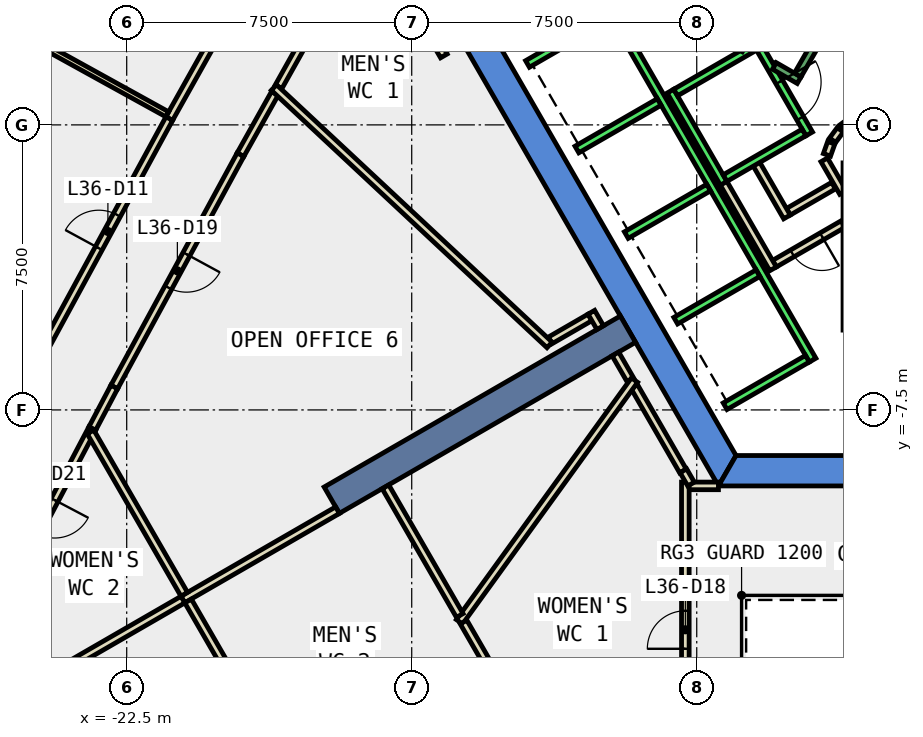
"""IFC4 building model, lengths in metres.
Left out: names, types, materials, properties, quantities, classifications, styles, units other than length and angle.
Written with IfcOpenShell. Run it as: python <this file> out.ifc"""

import sys

from ifc_helpers import new_model, si_unit, direction, frame, frame_2d, origin, place, context, subcontext, project, spatial, polyline, rectangle, outline, extrude, element, fill, save


model = new_model("IFC4")
c1 = context("Model", 3, precision=1e-05, world=origin(), true_north=direction((0.0, 1.0)))
c2 = subcontext(c1, "Body", "Model", "MODEL_VIEW")
j1 = project(units=[si_unit("LENGTHUNIT", "METRE"), si_unit("PLANEANGLEUNIT", "RADIAN")], contexts=[c1])
p1 = place(None, origin())
s1 = spatial("IfcSite", under=j1, at=p1, CompositionType="ELEMENT")
p2 = place(p1, origin())
s2 = spatial("IfcBuilding", under=s1, at=p2, CompositionType="ELEMENT")
p3 = place(p2, frame((0.0, 0.0, 163.4)))
s3 = spatial("IfcBuildingStorey", under=s2, at=p3, CompositionType="ELEMENT", Elevation=163.4)
p4 = place(p3, frame((0.0, 0.0, -0.4)))
e1 = element("IfcWall", 1, at=p4, inside=s3, PredefinedType="SHEAR", context=c2, shape_type="SweptSolid", body=[
    extrude(outline(polyline([(-13.856, 2.5), (-6.928, -9.5), (-6.466, -8.7), (-12.933, 2.5), (-13.856, 2.5)])), origin(), (0.0, 0.0, 1.0), 4.2),
])
p5 = place(p3, frame((0.0, 0.0, -0.4)))
e2 = element("IfcWall", 2, at=p5, inside=s3, PredefinedType="SHEAR", context=c2, shape_type="SweptSolid", body=[
    extrude(outline(polyline([(3.75, -9.5), (3.75, -8.7), (-6.466, -8.7), (-6.928, -9.5), (3.75, -9.5)])), origin(), (0.0, 0.0, 1.0), 4.2),
])
p6 = place(p3, frame((-9.31, -5.375, -0.4), z_axis=(0.0, 0.0, 1.0), x_axis=(-0.866017533419, -0.500013631625, 0.0)))
e3 = element("IfcWall", 3, at=p6, inside=s3, PredefinedType="SHEAR", context=c2, shape_type="SweptSolid", body=[
    extrude(rectangle(XDim=9.0, YDim=0.8, at=frame_2d((4.5, 0.0))), origin(), (0.0, 0.0, 1.0), 4.2),
])
p7 = place(p3, frame((-14.154, 1.815, 0.0), z_axis=(0.0, 0.0, 1.0), x_axis=(-0.500038857296, 0.866002968352, 0.0)))
e4 = element("IfcWall", 4, at=p7, inside=s3, PredefinedType="PARTITIONING", context=c2, shape_type="SweptSolid", body=[
    extrude(rectangle(XDim=3.34, YDim=0.2, at=frame_2d((1.67, 0.0))), origin(), (0.0, 0.0, 1.0), 3.8),
])
p8 = place(p3, frame((-16.255, 5.014, 0.0), z_axis=(0.0, 0.0, 1.0), x_axis=(-0.488988017817, -0.87229050117, 0.0)))
e5 = element("IfcWall", 5, at=p8, inside=s3, PredefinedType="PARTITIONING", context=c2, shape_type="SweptSolid", body=[
    extrude(rectangle(XDim=4.599, YDim=0.2, at=frame_2d((2.3, 0.0))), origin(), (0.0, 0.0, 1.0), 3.8),
])
p9 = place(p8, frame((1.8, 0.0, 0.0)))
e6 = element("IfcOpeningElement", 6, at=p9, cuts=e5, PredefinedType="OPENING", context=c2, shape_type="SweptSolid", body=[
    extrude(rectangle(XDim=1.0, YDim=2.1, at=frame_2d((0.5, 1.05))), frame((0.0, 0.11, 0.0), z_axis=(0.0, -1.0, 0.0), x_axis=(1.0, 0.0, 0.0)), (0.0, 0.0, 1.0), 0.22),
])
p10 = place(p3, frame((-18.602, 0.828, 0.0), z_axis=(0.0, 0.0, 1.0), x_axis=(-0.488969229043, -0.872301033502, 0.0)))
e7 = element("IfcWall", 7, at=p10, inside=s3, PredefinedType="PARTITIONING", context=c2, shape_type="SweptSolid", body=[
    extrude(rectangle(XDim=1.849, YDim=0.2, at=frame_2d((0.924, 0.0))), origin(), (0.0, 0.0, 1.0), 3.8),
])
p11 = place(p3, frame((-19.506, -0.785, 0.0), z_axis=(0.0, 0.0, 1.0), x_axis=(-0.477513909405, -0.878624189472, 0.0)))
e8 = element("IfcWall", 8, at=p11, inside=s3, PredefinedType="PARTITIONING", context=c2, shape_type="SweptSolid", body=[
    extrude(rectangle(XDim=6.956, YDim=0.2, at=frame_2d((3.478, 0.0))), origin(), (0.0, 0.0, 1.0), 3.8),
])
p12 = place(p11, frame((2.978, 0.0, 0.0)))
e9 = element("IfcOpeningElement", 9, at=p12, cuts=e8, PredefinedType="OPENING", context=c2, shape_type="SweptSolid", body=[
    extrude(rectangle(XDim=1.0, YDim=2.1, at=frame_2d((0.5, 1.05))), frame((0.0, 0.11, 0.0), z_axis=(0.0, -1.0, 0.0), x_axis=(1.0, 0.0, 0.0)), (0.0, 0.0, 1.0), 0.22),
])
p13 = place(p3, frame((-22.828, -6.897, 0.0), z_axis=(0.0, 0.0, 1.0), x_axis=(-0.467225806893, -0.884138023938, 0.0)))
e10 = element("IfcWall", 10, at=p13, inside=s3, PredefinedType="PARTITIONING", context=c2, shape_type="SweptSolid", body=[
    extrude(rectangle(XDim=1.237, YDim=0.2, at=frame_2d((0.619, 0.0))), origin(), (0.0, 0.0, 1.0), 3.8),
])
p14 = place(p3, frame((-23.406, -7.991, 0.0), z_axis=(0.0, 0.0, 1.0), x_axis=(-0.466307932558, -0.884622468646, 0.0)))
e11 = element("IfcWall", 11, at=p14, inside=s3, PredefinedType="PARTITIONING", context=c2, shape_type="SweptSolid", body=[
    extrude(rectangle(XDim=5.25, YDim=0.2, at=frame_2d((2.625, 0.0))), origin(), (0.0, 0.0, 1.0), 3.8),
])
p15 = place(p14, frame((2.125, 0.0, 0.0)))
e12 = element("IfcOpeningElement", 12, at=p15, cuts=e11, PredefinedType="OPENING", context=c2, shape_type="SweptSolid", body=[
    extrude(rectangle(XDim=1.0, YDim=2.1, at=frame_2d((0.5, 1.05))), frame((0.0, 0.11, 0.0), z_axis=(0.0, -1.0, 0.0), x_axis=(1.0, 0.0, 0.0)), (0.0, 0.0, 1.0), 0.22),
])
p16 = place(p3, frame((-21.381, 0.165, 0.0), z_axis=(0.0, 0.0, 1.0), x_axis=(0.489014139272, 0.872275857509, 0.0)))
e13 = element("IfcWall", 13, at=p16, inside=s3, PredefinedType="PARTITIONING", context=c2, shape_type="SweptSolid", body=[
    extrude(rectangle(XDim=7.057, YDim=0.2, at=frame_2d((3.529, 0.0))), origin(), (0.0, 0.0, 1.0), 3.8),
])
p17 = place(p16, frame((3.029, 0.0, 0.0)))
e14 = element("IfcOpeningElement", 14, at=p17, cuts=e13, PredefinedType="OPENING", context=c2, shape_type="SweptSolid", body=[
    extrude(rectangle(XDim=1.0, YDim=2.1, at=frame_2d((0.5, 1.05))), frame((0.0, 0.11, 0.0), z_axis=(0.0, -1.0, 0.0), x_axis=(1.0, 0.0, 0.0)), (0.0, 0.0, 1.0), 0.22),
])
p18 = place(p3, frame((-24.68, -5.906, 0.0), z_axis=(0.0, 0.0, 1.0), x_axis=(0.47757676389, 0.878590026459, 0.0)))
e15 = element("IfcWall", 15, at=p18, inside=s3, PredefinedType="PARTITIONING", context=c2, shape_type="SweptSolid", body=[
    extrude(rectangle(XDim=6.91, YDim=0.2, at=frame_2d((3.455, 0.0))), origin(), (0.0, 0.0, 1.0), 3.8),
])
p19 = place(p18, frame((3.029, 0.0, 0.0)))
e16 = element("IfcOpeningElement", 16, at=p19, cuts=e15, PredefinedType="OPENING", context=c2, shape_type="SweptSolid", body=[
    extrude(rectangle(XDim=1.0, YDim=2.1, at=frame_2d((0.5, 1.05))), frame((0.0, 0.11, 0.0), z_axis=(0.0, -1.0, 0.0), x_axis=(1.0, 0.0, 0.0)), (0.0, 0.0, 1.0), 0.22),
])
p20 = place(p3, frame((-3.9, -1.599, 0.0), z_axis=(0.0, 0.0, 1.0), x_axis=(-0.865969445389, -0.500096910261, 0.0)))
e17 = element("IfcWall", 17, at=p20, inside=s3, PredefinedType="PARTITIONING", context=c2, shape_type="SweptSolid", body=[
    extrude(rectangle(XDim=1.373, YDim=0.2, at=frame_2d((0.687, 0.0))), origin(), (0.0, 0.0, 1.0), 3.8),
])
p21 = place(p3, frame((-5.126, -2.422, 0.0), z_axis=(0.0, 0.0, 1.0), x_axis=(-0.500062241894, 0.865989465428, 0.0)))
e18 = element("IfcWall", 18, at=p21, inside=s3, PredefinedType="PARTITIONING", context=c2, shape_type="SweptSolid", body=[
    extrude(rectangle(XDim=1.7, YDim=0.2, at=frame_2d((0.85, 0.0))), origin(), (0.0, 0.0, 1.0), 3.8),
])
p22 = place(p3, frame((-3.65, -2.61, 0.0), z_axis=(0.0, 0.0, 1.0), x_axis=(-0.866072462134, -0.499918483688, 0.0)))
e19 = element("IfcWall", 19, at=p22, inside=s3, PredefinedType="PARTITIONING", context=c2, shape_type="SweptSolid", body=[
    extrude(rectangle(XDim=2.084, YDim=0.2, at=frame_2d((1.042, 0.0))), origin(), (0.0, 0.0, 1.0), 3.8),
])
p23 = place(p22, frame((0.642, 0.0, 0.0)))
e20 = element("IfcOpeningElement", 20, at=p23, cuts=e19, PredefinedType="OPENING", context=c2, shape_type="SweptSolid", body=[
    extrude(rectangle(XDim=0.9, YDim=2.1, at=frame_2d((0.45, 1.05))), frame((0.0, 0.11, 0.0), z_axis=(0.0, -1.0, 0.0), x_axis=(1.0, 0.0, 0.0)), (0.0, 0.0, 1.0), 0.22),
])
p24 = place(p3, frame((-5.492, -3.788, 0.0), z_axis=(0.0, 0.0, 1.0), x_axis=(-0.500008949224, 0.866020236886, 0.0)))
e21 = element("IfcWall", 21, at=p24, inside=s3, PredefinedType="PARTITIONING", context=c2, shape_type="SweptSolid", body=[
    extrude(rectangle(XDim=2.68, YDim=0.2, at=frame_2d((1.34, 0.0))), origin(), (0.0, 0.0, 1.0), 3.8),
])
p25 = place(p3, frame((-4.145, -0.92, 0.0), z_axis=(0.0, 0.0, 1.0), x_axis=(0.499743786207, -0.866173278362, 0.0)))
e22 = element("IfcWall", 22, at=p25, inside=s3, PredefinedType="PARTITIONING", context=c2, shape_type="SweptSolid", body=[
    extrude(rectangle(XDim=0.991, YDim=0.2, at=frame_2d((0.495, 0.0))), origin(), (0.0, 0.0, 1.0), 3.8),
])
p26 = place(p3, frame((-3.397, 0.124, 0.0), z_axis=(0.0, 0.0, 1.0), x_axis=(-0.804311165252, -0.594208338422, 0.0)))
e23 = element("IfcWall", 23, at=p26, inside=s3, PredefinedType="PARTITIONING", context=c2, shape_type="SweptSolid", body=[
    extrude(rectangle(XDim=0.338, YDim=0.2, at=frame_2d((0.169, 0.0))), origin(), (0.0, 0.0, 1.0), 3.8),
])
p27 = place(p3, frame((-3.723, -0.131, 0.0), z_axis=(0.0, 0.0, 1.0), x_axis=(-0.594675113454, -0.803966112121, 0.0)))
e24 = element("IfcWall", 24, at=p27, inside=s3, PredefinedType="PARTITIONING", context=c2, shape_type="SweptSolid", body=[
    extrude(rectangle(XDim=0.338, YDim=0.2, at=frame_2d((0.169, 0.0))), origin(), (0.0, 0.0, 1.0), 3.8),
])
p28 = place(p3, frame((-3.96, -0.47, 0.0), z_axis=(0.0, 0.0, 1.0), x_axis=(-0.334824194261, -0.942280615813, 0.0)))
e25 = element("IfcWall", 25, at=p28, inside=s3, PredefinedType="PARTITIONING", context=c2, shape_type="SweptSolid", body=[
    extrude(rectangle(XDim=0.338, YDim=0.2, at=frame_2d((0.169, 0.0))), origin(), (0.0, 0.0, 1.0), 3.8),
])
p29 = place(p3, frame((-7.722, -9.499, 0.0), z_axis=(0.0, 0.0, 1.0), x_axis=(1.0, 0.0, 0.0)))
e26 = element("IfcWall", 26, at=p29, inside=s3, PredefinedType="PARTITIONING", context=c2, shape_type="SweptSolid", body=[
    extrude(rectangle(XDim=0.793, YDim=0.2, at=frame_2d((0.396, 0.0))), origin(), (0.0, 0.0, 1.0), 3.8),
])
p30 = place(p3, frame((-7.8, -17.171, 0.0), z_axis=(0.0, 0.0, 1.0), x_axis=(0.0, 1.0, 0.0)))
e27 = element("IfcWall", 27, at=p30, inside=s3, PredefinedType="PARTITIONING", context=c2, shape_type="SweptSolid", body=[
    extrude(rectangle(XDim=7.772, YDim=0.2, at=frame_2d((3.886, 0.0))), origin(), (0.0, 0.0, 1.0), 3.8),
])
p31 = place(p30, frame((3.386, 0.0, 0.0)))
e28 = element("IfcOpeningElement", 28, at=p31, cuts=e27, PredefinedType="OPENING", context=c2, shape_type="SweptSolid", body=[
    extrude(rectangle(XDim=1.0, YDim=2.1, at=frame_2d((0.5, 1.05))), frame((0.0, 0.11, 0.0), z_axis=(0.0, -1.0, 0.0), x_axis=(1.0, 0.0, 0.0)), (0.0, 0.0, 1.0), 0.22),
])
p32 = place(p3, frame((-7.862, -9.107, 0.0), z_axis=(0.0, 0.0, 1.0), x_axis=(-0.499994038704, 0.866028845513, 0.0)))
e29 = element("IfcWall", 29, at=p32, inside=s3, PredefinedType="PARTITIONING", context=c2, shape_type="SweptSolid", body=[
    extrude(rectangle(XDim=2.568, YDim=0.2, at=frame_2d((1.284, 0.0))), origin(), (0.0, 0.0, 1.0), 3.8),
])
p33 = place(p3, frame((-7.65, -9.451, 0.0), z_axis=(0.0, 0.0, 1.0), x_axis=(-0.500297731093, 0.865853440406, 0.0)))
e30 = element("IfcWall", 30, at=p33, inside=s3, PredefinedType="PARTITIONING", context=c2, shape_type="SweptSolid", body=[
    extrude(rectangle(XDim=0.404, YDim=0.2, at=frame_2d((0.202, 0.0))), origin(), (0.0, 0.0, 1.0), 3.8),
])
p34 = place(p3, frame((-9.246, -6.71, 0.0), z_axis=(0.0, 0.0, 1.0), x_axis=(-0.499570510076, 0.86627322795, 0.0)))
e31 = element("IfcWall", 31, at=p34, inside=s3, PredefinedType="PARTITIONING", context=c2, shape_type="SweptSolid", body=[
    extrude(rectangle(XDim=0.788, YDim=0.2, at=frame_2d((0.394, 0.0))), origin(), (0.0, 0.0, 1.0), 3.8),
])
p35 = place(p3, frame((-10.31, -5.066, 0.0), z_axis=(0.0, 0.0, 1.0), x_axis=(-0.865587329375, -0.500758000661, 0.0)))
e32 = element("IfcWall", 32, at=p35, inside=s3, PredefinedType="PARTITIONING", context=c2, shape_type="SweptSolid", body=[
    extrude(rectangle(XDim=1.21, YDim=0.2, at=frame_2d((0.605, 0.0))), origin(), (0.0, 0.0, 1.0), 3.8),
])
p36 = place(p3, frame((-11.372, -5.79, 0.0), z_axis=(0.0, 0.0, 1.0), x_axis=(-0.730922728623, 0.682460229451, 0.0)))
e33 = element("IfcWall", 33, at=p36, inside=s3, PredefinedType="PARTITIONING", context=c2, shape_type="SweptSolid", body=[
    extrude(rectangle(XDim=9.924, YDim=0.2, at=frame_2d((4.962, 0.0))), origin(), (0.0, 0.0, 1.0), 3.8),
])
p37 = place(p3, frame((-13.744, -13.076, 0.0), z_axis=(0.0, 0.0, 1.0), x_axis=(0.586577314901, 0.809893235953, 0.0)))
e34 = element("IfcWall", 34, at=p37, inside=s3, PredefinedType="PARTITIONING", context=c2, shape_type="SweptSolid", body=[
    extrude(rectangle(XDim=7.854, YDim=0.2, at=frame_2d((3.927, 0.0))), origin(), (0.0, 0.0, 1.0), 3.8),
])
p38 = place(p3, frame((-11.328, -17.08, 0.0), z_axis=(0.0, 0.0, 1.0), x_axis=(-0.499972710878, 0.866041158593, 0.0)))
e35 = element("IfcWall", 35, at=p38, inside=s3, PredefinedType="PARTITIONING", context=c2, shape_type="SweptSolid", body=[
    extrude(rectangle(XDim=4.616, YDim=0.2, at=frame_2d((2.308, 0.0))), origin(), (0.0, 0.0, 1.0), 3.8),
])
p39 = place(p3, frame((-13.736, -12.909, 0.0), z_axis=(0.0, 0.0, 1.0), x_axis=(-0.49990810406, 0.866078453429, 0.0)))
e36 = element("IfcWall", 36, at=p39, inside=s3, PredefinedType="PARTITIONING", context=c2, shape_type="SweptSolid", body=[
    extrude(rectangle(XDim=3.908, YDim=0.2, at=frame_2d((1.954, 0.0))), origin(), (0.0, 0.0, 1.0), 3.8),
])
p40 = place(p3, frame((-16.952, -10.138, 0.0), z_axis=(0.0, 0.0, 1.0), x_axis=(-0.866054992606, -0.499948747156, 0.0)))
e37 = element("IfcWall", 37, at=p40, inside=s3, PredefinedType="PARTITIONING", context=c2, shape_type="SweptSolid", body=[
    extrude(rectangle(XDim=4.701, YDim=0.2, at=frame_2d((2.35, 0.0))), origin(), (0.0, 0.0, 1.0), 3.8),
])
p41 = place(p3, frame((-20.986, -12.351, 0.0), z_axis=(0.0, 0.0, 1.0), x_axis=(-0.499993851206, 0.866028953763, 0.0)))
e38 = element("IfcWall", 38, at=p41, inside=s3, PredefinedType="PARTITIONING", context=c2, shape_type="SweptSolid", body=[
    extrude(rectangle(XDim=4.932, YDim=0.2, at=frame_2d((2.466, 0.0))), origin(), (0.0, 0.0, 1.0), 3.8),
])
p42 = place(p3, frame((-18.366, -16.89, 0.0), z_axis=(0.0, 0.0, 1.0), x_axis=(-0.499965828395, 0.866045131871, 0.0)))
e39 = element("IfcWall", 39, at=p42, inside=s3, PredefinedType="PARTITIONING", context=c2, shape_type="SweptSolid", body=[
    extrude(rectangle(XDim=5.036, YDim=0.2, at=frame_2d((2.518, 0.0))), origin(), (0.0, 0.0, 1.0), 3.8),
])
p43 = place(p3, frame((-21.021, -12.491, 0.0), z_axis=(0.0, 0.0, 1.0), x_axis=(-0.865966890845, -0.500101333692, 0.0)))
e40 = element("IfcWall", 40, at=p43, inside=s3, PredefinedType="PARTITIONING", context=c2, shape_type="SweptSolid", body=[
    extrude(rectangle(XDim=5.931, YDim=0.2, at=frame_2d((2.965, 0.0))), origin(), (0.0, 0.0, 1.0), 3.8),
])
p44 = place(p3, frame((-21.432, 0.278, 0.0), z_axis=(0.0, 0.0, 1.0), x_axis=(-0.875412579047, 0.483376474857, 0.0)))
e41 = element("IfcWall", 41, at=p44, inside=s3, PredefinedType="PARTITIONING", context=c2, shape_type="SweptSolid", body=[
    extrude(rectangle(XDim=4.531, YDim=0.15, at=frame_2d((2.265, 0.0))), origin(), (0.0, 0.0, 1.0), 3.8),
])
p45 = place(p3, frame((-10.04, -5.334, 0.0), z_axis=(0.0, 0.0, 1.0), x_axis=(-0.499405191234, 0.86636854454, 0.0)))
e42 = element("IfcWall", 42, at=p45, inside=s3, PredefinedType="PARTITIONING", context=c2, shape_type="SweptSolid", body=[
    extrude(rectangle(XDim=0.466, YDim=0.2, at=frame_2d((0.233, 0.0))), origin(), (0.0, 0.0, 1.0), 3.8),
])
p46 = place(p3, frame((-5.94, 2.188, 0.0), z_axis=(0.0, 0.0, 1.0), x_axis=(0.49994636267, -0.866056369097, 0.0)))
e43 = element("IfcWall", 43, at=p46, inside=s3, PredefinedType="STANDARD", context=c2, shape_type="SweptSolid", body=[
    extrude(rectangle(XDim=2.8, YDim=0.2, at=frame_2d((1.4, 0.0))), origin(), (0.0, 0.0, 1.0), 3.8),
])
p47 = place(p46, frame((1.225, 0.0, 0.0)))
e44 = element("IfcOpeningElement", 44, at=p47, cuts=e43, PredefinedType="OPENING", context=c2, shape_type="SweptSolid", body=[
    extrude(rectangle(XDim=1.1, YDim=2.1, at=frame_2d((0.55, 1.05))), frame((0.0, 0.11, 0.0), z_axis=(0.0, -1.0, 0.0), x_axis=(1.0, 0.0, 0.0)), (0.0, 0.0, 1.0), 0.22),
])
p48 = place(p3, frame((-8.192, 0.888, 0.0), z_axis=(0.0, 0.0, 1.0), x_axis=(0.49994636267, -0.866056369097, 0.0)))
e45 = element("IfcWall", 45, at=p48, inside=s3, PredefinedType="STANDARD", context=c2, shape_type="SweptSolid", body=[
    extrude(rectangle(XDim=2.8, YDim=0.2, at=frame_2d((1.4, 0.0))), origin(), (0.0, 0.0, 1.0), 3.8),
])
for number, where, z_axis, x_axis in (
    (46, (-5.977, 2.052, 0.0), (0.0, 0.0, 1.0), (-0.866, -0.5, 0.0)),
    (47, (-4.677, -0.2, 0.0), (0.0, 0.0, 1.0), (-0.866, -0.5, 0.0)),
):
    element("IfcWall", number, at=place(p3, frame(where, z_axis=z_axis, x_axis=x_axis)), inside=s3, PredefinedType="STANDARD", context=c2, shape_type="SweptSolid", body=[
        extrude(rectangle(XDim=2.399, YDim=0.2, at=frame_2d((1.2, 0.0))), origin(), (0.0, 0.0, 1.0), 3.8),
    ])
p49 = place(p3, frame((-9.751, 2.99, 0.0), z_axis=(0.0, 0.0, 1.0), x_axis=(0.50000090737, -0.866024879913, 0.0)))
e48 = element("IfcWall", 48, at=p49, inside=s3, PredefinedType="STANDARD", context=c2, shape_type="SweptSolid", body=[
    extrude(rectangle(XDim=10.6, YDim=0.2, at=frame_2d((5.3, 0.0))), origin(), (0.0, 0.0, 1.0), 3.8),
])
p50 = place(p3, frame((-9.788, 2.853, 0.0), z_axis=(0.0, 0.0, 1.0), x_axis=(-0.865998541277, -0.500046524342, 0.0)))
e49 = element("IfcWall", 49, at=p50, inside=s3, PredefinedType="STANDARD", context=c2, shape_type="SweptSolid", body=[
    extrude(rectangle(XDim=2.5, YDim=0.2, at=frame_2d((1.25, 0.0))), origin(), (0.0, 0.0, 1.0), 3.8),
])
for number, where, z_axis, x_axis in (
    (50, (-8.488, 0.602, 0.0), (0.0, 0.0, 1.0), (-0.866, -0.5, 0.0)),
    (51, (-7.188, -1.65, 0.0), (0.0, 0.0, 1.0), (-0.866, -0.5, 0.0)),
    (52, (-5.888, -3.902, 0.0), (0.0, 0.0, 1.0), (-0.866, -0.5, 0.0)),
    (53, (-4.588, -6.153, 0.0), (0.0, 0.0, 1.0), (-0.866, -0.5, 0.0)),
):
    element("IfcWall", number, at=place(p3, frame(where, z_axis=z_axis, x_axis=x_axis)), inside=s3, PredefinedType="STANDARD", context=c2, shape_type="SweptSolid", body=[
        extrude(rectangle(XDim=2.5, YDim=0.2, at=frame_2d((1.25, 0.0))), origin(), (0.0, 0.0, 1.0), 3.8),
    ])
p51 = place(p3, frame((-3.55, -1.0, 0.0), z_axis=(0.0, 0.0, 1.0), x_axis=(0.0, -1.0, 0.0)))
e54 = element("IfcWall", 54, at=p51, inside=s3, PredefinedType="STANDARD", context=c2, shape_type="SweptSolid", body=[
    extrude(rectangle(XDim=4.4, YDim=0.2, at=frame_2d((2.2, 0.0))), origin(), (0.0, 0.0, 1.0), 3.8),
])
p52 = place(p51, frame((1.65, 0.0, 0.0)))
e55 = element("IfcOpeningElement", 55, at=p52, cuts=e54, PredefinedType="OPENING", context=c2, shape_type="SweptSolid", body=[
    extrude(rectangle(XDim=1.1, YDim=2.2, at=frame_2d((0.55, 1.1))), frame((0.0, 0.11, 0.0), z_axis=(0.0, -1.0, 0.0), x_axis=(1.0, 0.0, 0.0)), (0.0, 0.0, 1.0), 0.22),
])
p53 = place(p3, frame((-4.806, 1.176, 0.0), z_axis=(0.0, 0.0, 1.0), x_axis=(-0.866558586415, 0.499075361355, 0.0)))
e56 = element("IfcWall", 56, at=p53, inside=s3, PredefinedType="STANDARD", context=c2, shape_type="SweptSolid", body=[
    extrude(rectangle(XDim=0.751, YDim=0.2, at=frame_2d((0.376, 0.0))), origin(), (0.0, 0.0, 1.0), 3.8),
])
p54 = place(p3, frame((-1.393, 7.288, 0.0), z_axis=(0.0, 0.0, 1.0), x_axis=(-0.499963383562, -0.866046543262, 0.0)))
e57 = element("IfcWall", 57, at=p54, inside=s3, PredefinedType="STANDARD", context=c2, shape_type="SweptSolid", body=[
    extrude(rectangle(XDim=6.9, YDim=0.2, at=frame_2d((3.45, 0.0))), origin(), (0.0, 0.0, 1.0), 3.8),
])
p55 = place(p54, frame((0.45, 0.0, 0.0)))
e58 = element("IfcOpeningElement", 58, at=p55, cuts=e57, PredefinedType="OPENING", context=c2, shape_type="SweptSolid", body=[
    extrude(rectangle(XDim=1.1, YDim=2.2, at=frame_2d((0.55, 1.1))), frame((0.0, 0.11, 0.0), z_axis=(0.0, -1.0, 0.0), x_axis=(1.0, 0.0, 0.0)), (0.0, 0.0, 1.0), 0.22),
])
p56 = place(p19, origin())
e59 = element("IfcDoor", 59, at=p56, inside=s3, OperationType="SINGLE_SWING_LEFT", PredefinedType="DOOR", context=c2, shape_type="SweptSolid", body=[
    extrude(rectangle(XDim=1.0, YDim=2.1, at=frame_2d((0.5, 1.05))), frame((0.0, 0.025, 0.0), z_axis=(0.0, -1.0, 0.0), x_axis=(1.0, 0.0, 0.0)), (0.0, 0.0, 1.0), 0.05),
])
fill(e16, e59)
p57 = place(p31, origin())
e60 = element("IfcDoor", 60, at=p57, inside=s3, OperationType="SINGLE_SWING_LEFT", PredefinedType="DOOR", context=c2, shape_type="SweptSolid", body=[
    extrude(rectangle(XDim=1.0, YDim=2.1, at=frame_2d((0.5, 1.05))), frame((0.0, 0.025, 0.0), z_axis=(0.0, -1.0, 0.0), x_axis=(1.0, 0.0, 0.0)), (0.0, 0.0, 1.0), 0.05),
])
fill(e28, e60)
p58 = place(p12, origin())
e61 = element("IfcDoor", 61, at=p58, inside=s3, OperationType="SINGLE_SWING_LEFT", PredefinedType="DOOR", context=c2, shape_type="SweptSolid", body=[
    extrude(rectangle(XDim=1.0, YDim=2.1, at=frame_2d((0.5, 1.05))), frame((0.0, 0.025, 0.0), z_axis=(0.0, -1.0, 0.0), x_axis=(1.0, 0.0, 0.0)), (0.0, 0.0, 1.0), 0.05),
])
fill(e9, e61)
p59 = place(p15, origin())
e62 = element("IfcDoor", 62, at=p59, inside=s3, OperationType="SINGLE_SWING_LEFT", PredefinedType="DOOR", context=c2, shape_type="SweptSolid", body=[
    extrude(rectangle(XDim=1.0, YDim=2.1, at=frame_2d((0.5, 1.05))), frame((0.0, 0.025, 0.0), z_axis=(0.0, -1.0, 0.0), x_axis=(1.0, 0.0, 0.0)), (0.0, 0.0, 1.0), 0.05),
])
fill(e12, e62)
p60 = place(p23, origin())
e63 = element("IfcDoor", 63, at=p60, inside=s3, OperationType="SINGLE_SWING_LEFT", PredefinedType="DOOR", context=c2, shape_type="SweptSolid", body=[
    extrude(rectangle(XDim=0.9, YDim=2.1, at=frame_2d((0.45, 1.05))), frame((0.0, 0.025, 0.0), z_axis=(0.0, -1.0, 0.0), x_axis=(1.0, 0.0, 0.0)), (0.0, 0.0, 1.0), 0.05),
])
fill(e20, e63)
p61 = place(p47, origin())
e64 = element("IfcDoor", 64, at=p61, inside=s3, OperationType="SLIDING_TO_LEFT", PredefinedType="DOOR", context=c2, shape_type="SweptSolid", body=[
    extrude(rectangle(XDim=1.1, YDim=2.1, at=frame_2d((0.55, 1.05))), frame((0.0, 0.025, 0.0), z_axis=(0.0, -1.0, 0.0), x_axis=(1.0, 0.0, 0.0)), (0.0, 0.0, 1.0), 0.05),
])
fill(e44, e64)
save(model, sys.argv[1])
